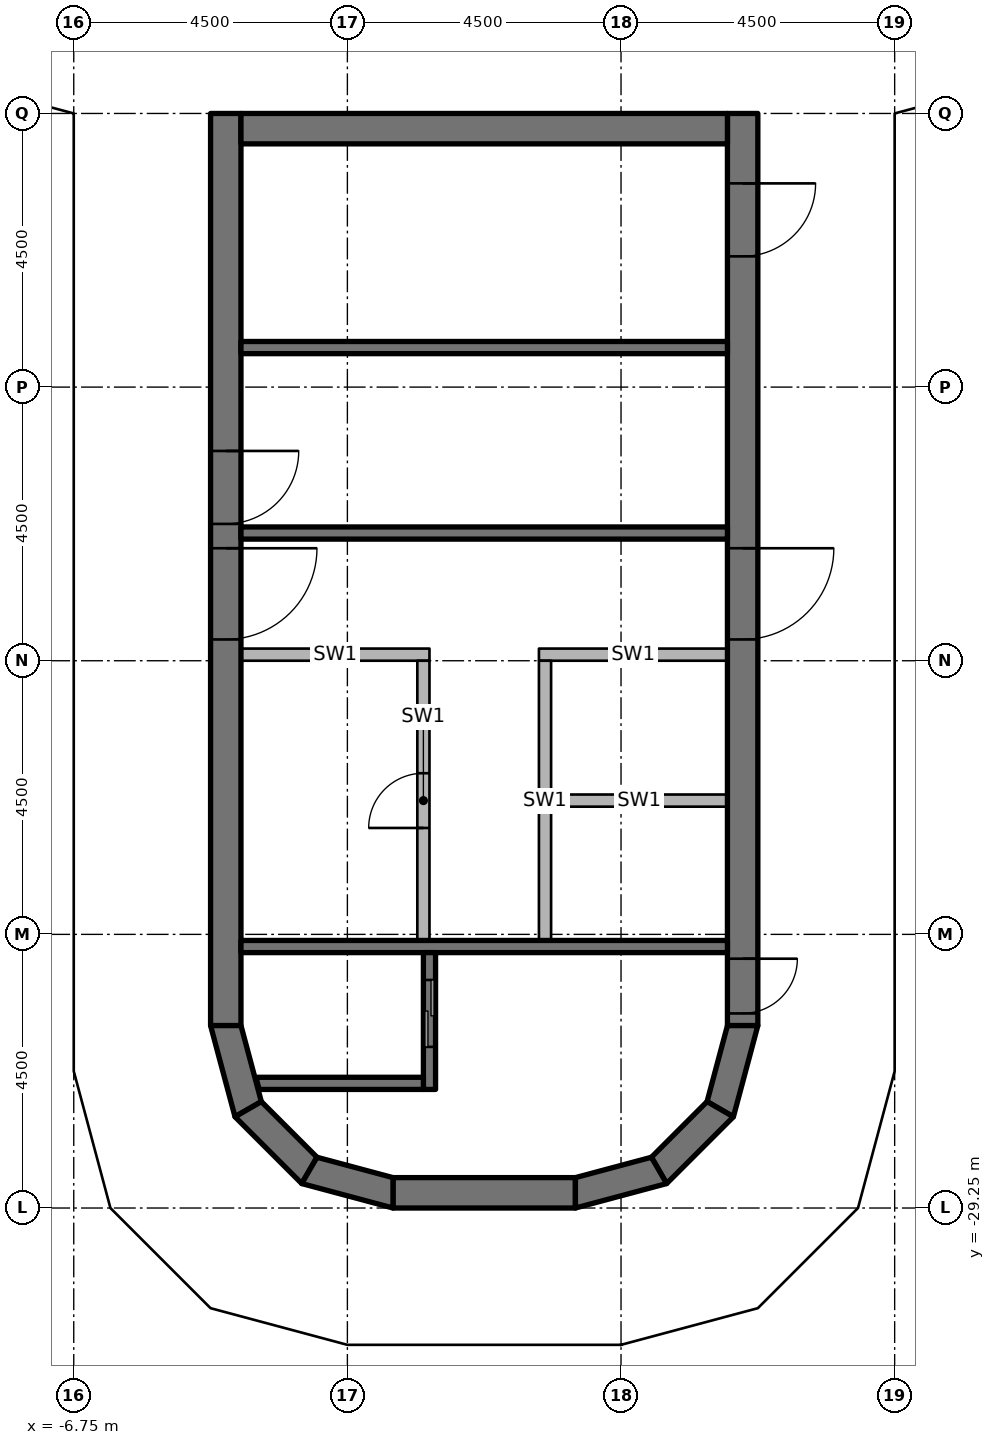
"""IFC4 building model, lengths in metres.
Left out: names, types, materials, properties, quantities, classifications, styles, units other than length and angle.
Written with IfcOpenShell. Run it as: python <this file> out.ifc"""

import sys

from ifc_helpers import new_model, si_unit, direction, frame, frame_2d, origin, origin_2d, place, context, subcontext, project, spatial, polyline, rectangle, outline, extrude, element, fill, save


model = new_model("IFC4")
c1 = context("Model", 3, precision=1e-05, world=origin(), true_north=direction((0.0, 1.0)))
c2 = subcontext(c1, "Body", "Model", "MODEL_VIEW")
j1 = project(units=[si_unit("LENGTHUNIT", "METRE"), si_unit("PLANEANGLEUNIT", "RADIAN")], contexts=[c1])
p1 = place(None, origin())
s1 = spatial("IfcSite", under=j1, at=p1, CompositionType="ELEMENT")
p2 = place(p1, origin())
s2 = spatial("IfcBuilding", under=s1, at=p2, CompositionType="ELEMENT")
p3 = place(p2, frame((0.0, 0.0, 284.0)))
s3 = spatial("IfcBuildingStorey", under=s2, at=p3, CompositionType="ELEMENT", Elevation=284.0)
for number, where, z_axis, x_axis in (
    (1, (-6.25, -26.9, 0.0), (0.0, 0.0, 1.0), (1.0, 0.0, 0.0)),
    (2, (-6.25, -24.65, 0.0), (0.0, 0.0, 1.0), (1.0, 0.0, 0.0)),
    (3, (-6.25, -20.25, 0.0), (0.0, 0.0, 1.0), (1.0, 0.0, 0.0)),
    (4, (-6.25, -15.75, 0.0), (0.0, 0.0, 1.0), (1.0, 0.0, 0.0)),
    (5, (-6.25, -10.75, 0.0), (0.0, 0.0, 1.0), (1.0, 0.0, 0.0)),
    (6, (6.25, -26.9, 0.0), (0.0, 0.0, 1.0), (1.0, 0.0, 0.0)),
    (7, (6.25, -24.65, 0.0), (0.0, 0.0, 1.0), (1.0, 0.0, 0.0)),
    (8, (6.25, -20.25, 0.0), (0.0, 0.0, 1.0), (1.0, 0.0, 0.0)),
    (9, (6.25, -15.75, 0.0), (0.0, 0.0, 1.0), (1.0, 0.0, 0.0)),
    (10, (6.25, -10.75, 0.0), (0.0, 0.0, 1.0), (1.0, 0.0, 0.0)),
):
    element("IfcColumn", number, at=place(p3, frame(where, z_axis=z_axis, x_axis=x_axis)), inside=s3, PredefinedType="COLUMN", context=c2, shape_type="SweptSolid", body=[
        extrude(rectangle(XDim=0.6, YDim=0.6, at=origin_2d()), origin(), (0.0, 0.0, 1.0), 7.45),
    ])
p4 = place(p3, frame((-4.25, -11.25, 0.0), z_axis=(0.0, 0.0, 1.0), x_axis=(0.0, -1.0, 0.0)))
e11 = element("IfcWall", 11, at=p4, inside=s3, PredefinedType="SHEAR", context=c2, shape_type="SweptSolid", body=[
    extrude(rectangle(XDim=15.0, YDim=0.5, at=frame_2d((7.5, 0.0))), origin(), (0.0, 0.0, 1.0), 7.6),
])
p5 = place(p4, frame((7.15, 0.0, 0.0)))
e12 = element("IfcOpeningElement", 12, at=p5, cuts=e11, PredefinedType="OPENING", context=c2, shape_type="SweptSolid", body=[
    extrude(rectangle(XDim=1.5, YDim=2.3, at=frame_2d((0.75, 1.15))), frame((0.0, 0.26, 0.0), z_axis=(0.0, -1.0, 0.0), x_axis=(1.0, 0.0, 0.0)), (0.0, 0.0, 1.0), 0.52),
])
p6 = place(p4, frame((5.55, 0.0, 0.0)))
e13 = element("IfcOpeningElement", 13, at=p6, cuts=e11, PredefinedType="OPENING", context=c2, shape_type="SweptSolid", body=[
    extrude(rectangle(XDim=1.2, YDim=2.1, at=frame_2d((0.6, 1.05))), frame((0.0, 0.26, 0.0), z_axis=(0.0, -1.0, 0.0), x_axis=(1.0, 0.0, 0.0)), (0.0, 0.0, 1.0), 0.52),
])
p7 = place(p3, frame((4.25, -11.25, 0.0), z_axis=(0.0, 0.0, 1.0), x_axis=(0.0, -1.0, 0.0)))
e14 = element("IfcWall", 14, at=p7, inside=s3, PredefinedType="SHEAR", context=c2, shape_type="SweptSolid", body=[
    extrude(rectangle(XDim=15.0, YDim=0.5, at=frame_2d((7.5, 0.0))), origin(), (0.0, 0.0, 1.0), 7.6),
])
p8 = place(p7, frame((7.15, 0.0, 0.0)))
e15 = element("IfcOpeningElement", 15, at=p8, cuts=e14, PredefinedType="OPENING", context=c2, shape_type="SweptSolid", body=[
    extrude(rectangle(XDim=1.5, YDim=2.3, at=frame_2d((0.75, 1.15))), frame((0.0, 0.26, 0.0), z_axis=(0.0, -1.0, 0.0), x_axis=(1.0, 0.0, 0.0)), (0.0, 0.0, 1.0), 0.52),
])
p9 = place(p7, frame((13.9, 0.0, 0.0)))
e16 = element("IfcOpeningElement", 16, at=p9, cuts=e14, PredefinedType="OPENING", context=c2, shape_type="SweptSolid", body=[
    extrude(rectangle(XDim=0.9, YDim=2.1, at=frame_2d((0.45, 1.05))), frame((0.0, 0.26, 0.0), z_axis=(0.0, -1.0, 0.0), x_axis=(1.0, 0.0, 0.0)), (0.0, 0.0, 1.0), 0.52),
])
p10 = place(p7, frame((1.15, 0.0, 0.0)))
e17 = element("IfcOpeningElement", 17, at=p10, cuts=e14, PredefinedType="OPENING", context=c2, shape_type="SweptSolid", body=[
    extrude(rectangle(XDim=1.2, YDim=2.1, at=frame_2d((0.6, 1.05))), frame((0.0, 0.26, 0.0), z_axis=(0.0, -1.0, 0.0), x_axis=(1.0, 0.0, 0.0)), (0.0, 0.0, 1.0), 0.52),
])
p11 = place(p3, frame((-4.0, -11.5, 0.0), z_axis=(0.0, 0.0, 1.0), x_axis=(1.0, 0.0, 0.0)))
e18 = element("IfcWall", 18, at=p11, inside=s3, PredefinedType="SHEAR", context=c2, shape_type="SweptSolid", body=[
    extrude(rectangle(XDim=8.0, YDim=0.5, at=frame_2d((4.0, 0.0))), origin(), (0.0, 0.0, 1.0), 7.6),
])
p12 = place(p3, frame((-1.5, -29.0, 0.0), z_axis=(0.0, 0.0, 1.0), x_axis=(1.0, 0.0, 0.0)))
e19 = element("IfcWall", 19, at=p12, inside=s3, PredefinedType="SHEAR", context=c2, shape_type="SweptSolid", body=[
    extrude(rectangle(XDim=3.0, YDim=0.5, at=frame_2d((1.5, 0.0))), origin(), (0.0, 0.0, 1.0), 7.6),
])
p13 = place(p3, origin())
e20 = element("IfcWall", 20, at=p13, inside=s3, PredefinedType="SHEAR", context=c2, shape_type="SweptSolid", body=[
    extrude(outline(polyline([(-4.5, -26.25), (-4.098, -27.75), (-3.665, -27.5), (-4.0, -26.25), (-4.5, -26.25)])), origin(), (0.0, 0.0, 1.0), 7.6),
])
p14 = place(p3, origin())
e21 = element("IfcWall", 21, at=p14, inside=s3, PredefinedType="SHEAR", context=c2, shape_type="SweptSolid", body=[
    extrude(outline(polyline([(-4.098, -27.75), (-3.0, -28.848), (-2.75, -28.415), (-3.665, -27.5), (-4.098, -27.75)])), origin(), (0.0, 0.0, 1.0), 7.6),
])
p15 = place(p3, origin())
e22 = element("IfcWall", 22, at=p15, inside=s3, PredefinedType="SHEAR", context=c2, shape_type="SweptSolid", body=[
    extrude(outline(polyline([(-3.0, -28.848), (-1.5, -29.25), (-1.5, -28.75), (-2.75, -28.415), (-3.0, -28.848)])), origin(), (0.0, 0.0, 1.0), 7.6),
])
p16 = place(p3, origin())
e23 = element("IfcWall", 23, at=p16, inside=s3, PredefinedType="SHEAR", context=c2, shape_type="SweptSolid", body=[
    extrude(outline(polyline([(4.5, -26.25), (4.098, -27.75), (3.665, -27.5), (4.0, -26.25), (4.5, -26.25)])), origin(), (0.0, 0.0, 1.0), 7.6),
])
p17 = place(p3, origin())
e24 = element("IfcWall", 24, at=p17, inside=s3, PredefinedType="SHEAR", context=c2, shape_type="SweptSolid", body=[
    extrude(outline(polyline([(4.098, -27.75), (3.0, -28.848), (2.75, -28.415), (3.665, -27.5), (4.098, -27.75)])), origin(), (0.0, 0.0, 1.0), 7.6),
])
p18 = place(p3, origin())
e25 = element("IfcWall", 25, at=p18, inside=s3, PredefinedType="SHEAR", context=c2, shape_type="SweptSolid", body=[
    extrude(outline(polyline([(3.0, -28.848), (1.5, -29.25), (1.5, -28.75), (2.75, -28.415), (3.0, -28.848)])), origin(), (0.0, 0.0, 1.0), 7.6),
])
p19 = place(p3, frame((4.0, -24.95, 0.0), z_axis=(0.0, 0.0, 1.0), x_axis=(-1.0, 0.0, 0.0)))
e26 = element("IfcWall", 26, at=p19, inside=s3, PredefinedType="SHEAR", context=c2, shape_type="SweptSolid", body=[
    extrude(rectangle(XDim=8.0, YDim=0.2, at=frame_2d((4.0, 0.0))), origin(), (0.0, 0.0, 1.0), 7.45),
])
p20 = place(p3, frame((-0.9, -27.3, 0.0), z_axis=(0.0, 0.0, 1.0), x_axis=(0.0, 1.0, 0.0)))
e27 = element("IfcWall", 27, at=p20, inside=s3, PredefinedType="SHEAR", context=c2, shape_type="SweptSolid", body=[
    extrude(rectangle(XDim=2.25, YDim=0.2, at=frame_2d((1.125, 0.0))), origin(), (0.0, 0.0, 1.0), 7.45),
])
p21 = place(p20, frame((0.7, 0.0, 0.0)))
e28 = element("IfcOpeningElement", 28, at=p21, cuts=e27, PredefinedType="OPENING", context=c2, shape_type="SweptSolid", body=[
    extrude(rectangle(XDim=1.1, YDim=2.3, at=frame_2d((0.55, 1.15))), frame((0.0, 0.11, 0.0), z_axis=(0.0, -1.0, 0.0), x_axis=(1.0, 0.0, 0.0)), (0.0, 0.0, 1.0), 0.22),
])
p22 = place(p3, origin())
e29 = element("IfcWall", 29, at=p22, inside=s3, PredefinedType="SHEAR", context=c2, shape_type="SweptSolid", body=[
    extrude(outline(polyline([(-1.0, -27.1), (-3.755, -27.1), (-3.701, -27.3), (-1.0, -27.3), (-1.0, -27.1)])), origin(), (0.0, 0.0, 1.0), 7.45),
])
for number, where, z_axis, x_axis in (
    (30, (4.0, -18.15, 0.0), (0.0, 0.0, 1.0), (-1.0, 0.0, 0.0)),
    (31, (4.0, -15.1, 0.0), (0.0, 0.0, 1.0), (-1.0, 0.0, 0.0)),
):
    element("IfcWall", number, at=place(p3, frame(where, z_axis=z_axis, x_axis=x_axis)), inside=s3, PredefinedType="SHEAR", context=c2, shape_type="SweptSolid", body=[
        extrude(rectangle(XDim=8.0, YDim=0.2, at=frame_2d((4.0, 0.0))), origin(), (0.0, 0.0, 1.0), 7.45),
    ])
p23 = place(p3, frame((4.0, -20.15, 0.0), z_axis=(0.0, 0.0, 1.0), x_axis=(-1.0, 0.0, 0.0)))
e32 = element("IfcWall", 32, at=p23, inside=s3, PredefinedType="PARTITIONING", context=c2, shape_type="SweptSolid", body=[
    extrude(rectangle(XDim=3.1, YDim=0.2, at=frame_2d((1.55, 0.0))), origin(), (0.0, 0.0, 1.0), 7.45),
])
p24 = place(p3, frame((1.0, -24.85, 0.0), z_axis=(0.0, 0.0, 1.0), x_axis=(0.0, 1.0, 0.0)))
e33 = element("IfcWall", 33, at=p24, inside=s3, PredefinedType="PARTITIONING", context=c2, shape_type="SweptSolid", body=[
    extrude(rectangle(XDim=4.6, YDim=0.2, at=frame_2d((2.3, 0.0))), origin(), (0.0, 0.0, 1.0), 7.45),
])
p25 = place(p3, frame((-0.9, -20.15, 0.0), z_axis=(0.0, 0.0, 1.0), x_axis=(-1.0, 0.0, 0.0)))
e34 = element("IfcWall", 34, at=p25, inside=s3, PredefinedType="PARTITIONING", context=c2, shape_type="SweptSolid", body=[
    extrude(rectangle(XDim=3.1, YDim=0.2, at=frame_2d((1.55, 0.0))), origin(), (0.0, 0.0, 1.0), 7.45),
])
p26 = place(p3, frame((-1.0, -24.85, 0.0), z_axis=(0.0, 0.0, 1.0), x_axis=(0.0, 1.0, 0.0)))
e35 = element("IfcWall", 35, at=p26, inside=s3, PredefinedType="PARTITIONING", context=c2, shape_type="SweptSolid", body=[
    extrude(rectangle(XDim=4.6, YDim=0.2, at=frame_2d((2.3, 0.0))), origin(), (0.0, 0.0, 1.0), 7.45),
])
p27 = place(p26, frame((1.85, 0.0, 0.0)))
e36 = element("IfcOpeningElement", 36, at=p27, cuts=e35, PredefinedType="OPENING", context=c2, shape_type="SweptSolid", body=[
    extrude(rectangle(XDim=0.9, YDim=2.1, at=frame_2d((0.45, 1.05))), frame((0.0, 0.11, 0.0), z_axis=(0.0, -1.0, 0.0), x_axis=(1.0, 0.0, 0.0)), (0.0, 0.0, 1.0), 0.22),
])
p28 = place(p3, frame((4.0, -22.55, 0.0), z_axis=(0.0, 0.0, 1.0), x_axis=(-1.0, 0.0, 0.0)))
e37 = element("IfcWall", 37, at=p28, inside=s3, PredefinedType="PARTITIONING", context=c2, shape_type="SweptSolid", body=[
    extrude(rectangle(XDim=2.9, YDim=0.2, at=frame_2d((1.45, 0.0))), origin(), (0.0, 0.0, 1.0), 7.45),
])
p29 = place(p8, origin())
e38 = element("IfcDoor", 38, at=p29, inside=s3, OperationType="DOUBLE_DOOR_SINGLE_SWING", PredefinedType="DOOR", context=c2, shape_type="SweptSolid", body=[
    extrude(rectangle(XDim=1.5, YDim=2.3, at=frame_2d((0.75, 1.15))), frame((0.0, 0.025, 0.0), z_axis=(0.0, -1.0, 0.0), x_axis=(1.0, 0.0, 0.0)), (0.0, 0.0, 1.0), 0.05),
])
fill(e15, e38)
p30 = place(p5, origin())
e39 = element("IfcDoor", 39, at=p30, inside=s3, OperationType="DOUBLE_DOOR_SINGLE_SWING", PredefinedType="DOOR", context=c2, shape_type="SweptSolid", body=[
    extrude(rectangle(XDim=1.5, YDim=2.3, at=frame_2d((0.75, 1.15))), frame((0.0, 0.025, 0.0), z_axis=(0.0, -1.0, 0.0), x_axis=(1.0, 0.0, 0.0)), (0.0, 0.0, 1.0), 0.05),
])
fill(e12, e39)
p31 = place(p9, origin())
e40 = element("IfcDoor", 40, at=p31, inside=s3, OperationType="SINGLE_SWING_LEFT", PredefinedType="DOOR", context=c2, shape_type="SweptSolid", body=[
    extrude(rectangle(XDim=0.9, YDim=2.1, at=frame_2d((0.45, 1.05))), frame((0.0, 0.025, 0.0), z_axis=(0.0, -1.0, 0.0), x_axis=(1.0, 0.0, 0.0)), (0.0, 0.0, 1.0), 0.05),
])
fill(e16, e40)
p32 = place(p6, origin())
e41 = element("IfcDoor", 41, at=p32, inside=s3, OperationType="SINGLE_SWING_LEFT", PredefinedType="DOOR", context=c2, shape_type="SweptSolid", body=[
    extrude(rectangle(XDim=1.2, YDim=2.1, at=frame_2d((0.6, 1.05))), frame((0.0, 0.025, 0.0), z_axis=(0.0, -1.0, 0.0), x_axis=(1.0, 0.0, 0.0)), (0.0, 0.0, 1.0), 0.05),
])
fill(e13, e41)
p33 = place(p10, origin())
e42 = element("IfcDoor", 42, at=p33, inside=s3, OperationType="SINGLE_SWING_LEFT", PredefinedType="DOOR", context=c2, shape_type="SweptSolid", body=[
    extrude(rectangle(XDim=1.2, YDim=2.1, at=frame_2d((0.6, 1.05))), frame((0.0, 0.025, 0.0), z_axis=(0.0, -1.0, 0.0), x_axis=(1.0, 0.0, 0.0)), (0.0, 0.0, 1.0), 0.05),
])
fill(e17, e42)
p34 = place(p21, origin())
e43 = element("IfcDoor", 43, at=p34, inside=s3, OperationType="DOUBLE_DOOR_SLIDING", PredefinedType="DOOR", context=c2, shape_type="SweptSolid", body=[
    extrude(rectangle(XDim=1.1, YDim=2.3, at=frame_2d((0.55, 1.15))), frame((0.0, 0.025, 0.0), z_axis=(0.0, -1.0, 0.0), x_axis=(1.0, 0.0, 0.0)), (0.0, 0.0, 1.0), 0.05),
])
fill(e28, e43)
p35 = place(p27, origin())
e44 = element("IfcDoor", 44, at=p35, inside=s3, OperationType="SINGLE_SWING_LEFT", PredefinedType="DOOR", context=c2, shape_type="SweptSolid", body=[
    extrude(rectangle(XDim=0.9, YDim=2.1, at=frame_2d((0.45, 1.05))), frame((0.0, 0.025, 0.0), z_axis=(0.0, -1.0, 0.0), x_axis=(1.0, 0.0, 0.0)), (0.0, 0.0, 1.0), 0.05),
])
fill(e36, e44)
save(model, sys.argv[1])
